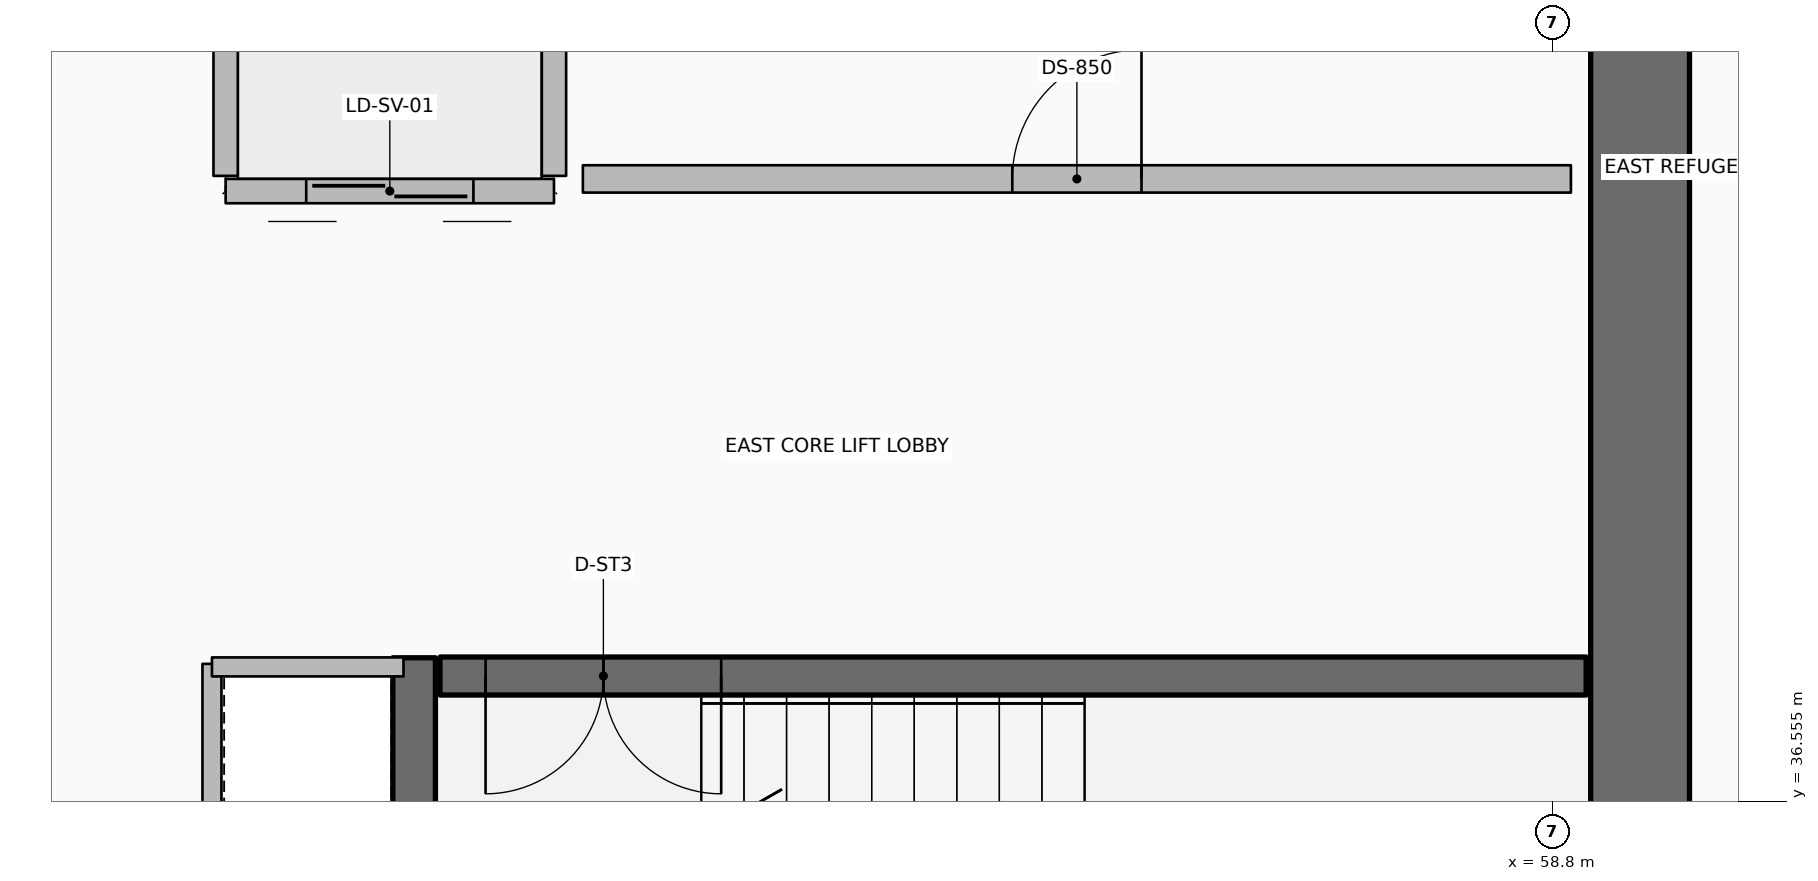
"""IFC4 building model, lengths in metres.
Left out: names, types, materials, properties, quantities, classifications, styles, units other than length and angle.
Written with IfcOpenShell. Run it as: python <this file> out.ifc"""

import sys

from ifc_helpers import new_model, si_unit, direction, frame, frame_2d, origin, origin_2d, place, context, subcontext, project, spatial, rectangle, hollow_rectangle, extrude, element, fill, save


model = new_model("IFC4")
c1 = context("Model", 3, precision=1e-05, world=origin(), true_north=direction((0.0, 1.0)))
c2 = subcontext(c1, "Body", "Model", "MODEL_VIEW")
j1 = project(units=[si_unit("LENGTHUNIT", "METRE"), si_unit("PLANEANGLEUNIT", "RADIAN")], contexts=[c1])
p1 = place(None, origin())
s1 = spatial("IfcSite", under=j1, at=p1, CompositionType="ELEMENT")
p2 = place(p1, origin())
s2 = spatial("IfcBuilding", under=s1, at=p2, CompositionType="ELEMENT")
p3 = place(p2, frame((0.0, 0.0, 225.3)))
s3 = spatial("IfcBuildingStorey", under=s2, at=p3, CompositionType="ELEMENT", Elevation=225.3)
p4 = place(p3, frame((59.375, 34.0, 0.0), z_axis=(0.0, 0.0, 1.0), x_axis=(0.0, 1.0, 0.0)))
e1 = element("IfcWall", 1, at=p4, inside=s3, PredefinedType="SHEAR", context=c2, shape_type="SweptSolid", body=[
    extrude(rectangle(XDim=16.0, YDim=0.65, at=frame_2d((8.0, 0.0))), origin(), (0.0, 0.0, 1.0), 6.6),
])
p5 = place(p3, frame((51.31, 34.0, 0.0), z_axis=(0.0, 0.0, 1.0), x_axis=(0.0, 1.0, 0.0)))
e2 = element("IfcWall", 2, at=p5, inside=s3, PredefinedType="SHEAR", context=c2, shape_type="SweptSolid", body=[
    extrude(rectangle(XDim=3.5, YDim=0.28, at=frame_2d((1.75, 0.0))), origin(), (0.0, 0.0, 1.0), 6.6),
])
p6 = place(p3, frame((55.72, 37.38, 0.0), z_axis=(0.0, 0.0, 1.0), x_axis=(1.0, 0.0, 0.0)))
e3 = element("IfcColumn", 3, at=p6, inside=s3, PredefinedType="COLUMN", context=c2, shape_type="SweptSolid", body=[
    extrude(hollow_rectangle(XDim=0.2, YDim=0.2, WallThickness=0.01, InnerFilletRadius=0.01, OuterFilletRadius=0.02, at=origin_2d()), origin(), (0.0, 0.0, 1.0), 1.445),
])
p7 = place(p3, frame((56.42, 37.38, 0.0), z_axis=(0.0, 0.0, 1.0), x_axis=(1.0, 0.0, 0.0)))
e4 = element("IfcColumn", 4, at=p7, inside=s3, PredefinedType="COLUMN", context=c2, shape_type="SweptSolid", body=[
    extrude(hollow_rectangle(XDim=0.2, YDim=0.2, WallThickness=0.01, InnerFilletRadius=0.01, OuterFilletRadius=0.02, at=origin_2d()), origin(), (0.0, 0.0, 1.0), 4.745),
])
p8 = place(p3, frame((51.48, 37.38, 0.0), z_axis=(0.0, 0.0, 1.0), x_axis=(1.0, 0.0, 0.0)))
e5 = element("IfcWall", 5, at=p8, inside=s3, PredefinedType="SOLIDWALL", context=c2, shape_type="SweptSolid", body=[
    extrude(rectangle(XDim=7.54, YDim=0.25, at=frame_2d((3.77, 0.0))), origin(), (0.0, 0.0, 1.0), 6.28),
])
p9 = place(p8, frame((0.3, 0.0, 0.0)))
e6 = element("IfcOpeningElement", 6, at=p9, cuts=e5, PredefinedType="OPENING", context=c2, shape_type="SweptSolid", body=[
    extrude(rectangle(XDim=1.55, YDim=2.15, at=frame_2d((0.775, 1.075))), frame((0.0, 0.135, 0.0), z_axis=(0.0, -1.0, 0.0), x_axis=(1.0, 0.0, 0.0)), (0.0, 0.0, 1.0), 0.27),
])
p10 = place(p3, frame((52.23, 40.57, 0.0), z_axis=(0.0, 0.0, 1.0), x_axis=(-1.0, 0.0, 0.0)))
e7 = element("IfcWall", 7, at=p10, inside=s3, PredefinedType="PARTITIONING", context=c2, shape_type="SweptSolid", body=[
    extrude(rectangle(XDim=2.16, YDim=0.16, at=frame_2d((1.08, 0.0))), origin(), (0.0, 0.0, 1.0), 6.28),
])
p11 = place(p10, frame((0.53, 0.0, 0.0)))
e8 = element("IfcOpeningElement", 8, at=p11, cuts=e7, PredefinedType="OPENING", context=c2, shape_type="SweptSolid", body=[
    extrude(rectangle(XDim=1.1, YDim=2.1, at=frame_2d((0.55, 1.05))), frame((0.0, 0.09, 0.0), z_axis=(0.0, -1.0, 0.0), x_axis=(1.0, 0.0, 0.0)), (0.0, 0.0, 1.0), 0.18),
])
for number, where, z_axis, x_axis in (
    (9, (52.23, 40.67, 0.0), (0.0, 0.0, 1.0), (0.0, 1.0, 0.0)),
    (10, (50.07, 40.67, 0.0), (0.0, 0.0, 1.0), (0.0, 1.0, 0.0)),
):
    element("IfcWall", number, at=place(p3, frame(where, z_axis=z_axis, x_axis=x_axis)), inside=s3, PredefinedType="PARTITIONING", context=c2, shape_type="SweptSolid", body=[
        extrude(rectangle(XDim=2.16, YDim=0.16, at=frame_2d((1.08, 0.0))), origin(), (0.0, 0.0, 1.0), 6.28),
    ])
p12 = place(p3, frame((52.42, 40.65, 0.0), z_axis=(0.0, 0.0, 1.0), x_axis=(1.0, 0.0, 0.0)))
e11 = element("IfcWall", 11, at=p12, inside=s3, PredefinedType="PARTITIONING", context=c2, shape_type="SweptSolid", body=[
    extrude(rectangle(XDim=6.5, YDim=0.18, at=frame_2d((3.25, 0.0))), origin(), (0.0, 0.0, 1.0), 6.28),
])
p13 = place(p12, frame((2.825, 0.0, 0.0)))
e12 = element("IfcOpeningElement", 12, at=p13, cuts=e11, PredefinedType="OPENING", context=c2, shape_type="SweptSolid", body=[
    extrude(rectangle(XDim=0.85, YDim=2.06, at=frame_2d((0.425, 1.03))), frame((0.0, 0.1, 0.0), z_axis=(0.0, -1.0, 0.0), x_axis=(1.0, 0.0, 0.0)), (0.0, 0.0, 1.0), 0.2),
])
p14 = place(p3, frame((49.98, 34.06, 0.0), z_axis=(0.0, 0.0, 1.0), x_axis=(0.0, 1.0, 0.0)))
e13 = element("IfcWall", 13, at=p14, inside=s3, PredefinedType="PARTITIONING", context=c2, shape_type="SweptSolid", body=[
    extrude(rectangle(XDim=3.4, YDim=0.125, at=frame_2d((1.7, 0.0))), origin(), (0.0, 0.0, 1.0), 5.72),
])
p15 = place(p3, frame((49.98, 37.44, 0.0), z_axis=(0.0, 0.0, 1.0), x_axis=(1.0, 0.0, 0.0)))
e14 = element("IfcWall", 14, at=p15, inside=s3, PredefinedType="PARTITIONING", context=c2, shape_type="SweptSolid", body=[
    extrude(rectangle(XDim=1.26, YDim=0.125, at=frame_2d((0.63, 0.0))), origin(), (0.0, 0.0, 1.0), 5.72),
])
p16 = place(p9, origin())
e15 = element("IfcDoor", 15, at=p16, inside=s3, OperationType="DOUBLE_DOOR_SINGLE_SWING", PredefinedType="DOOR", context=c2, shape_type="SweptSolid", body=[
    extrude(rectangle(XDim=1.55, YDim=2.15, at=frame_2d((0.775, 1.075))), frame((0.0, 0.025, 0.0), z_axis=(0.0, -1.0, 0.0), x_axis=(1.0, 0.0, 0.0)), (0.0, 0.0, 1.0), 0.05),
])
fill(e6, e15)
p17 = place(p11, origin())
e16 = element("IfcDoor", 16, at=p17, inside=s3, OperationType="DOUBLE_DOOR_SLIDING", PredefinedType="DOOR", context=c2, shape_type="SweptSolid", body=[
    extrude(rectangle(XDim=1.1, YDim=2.1, at=frame_2d((0.55, 1.05))), frame((0.0, 0.025, 0.0), z_axis=(0.0, -1.0, 0.0), x_axis=(1.0, 0.0, 0.0)), (0.0, 0.0, 1.0), 0.05),
])
fill(e8, e16)
p18 = place(p13, origin())
e17 = element("IfcDoor", 17, at=p18, inside=s3, OperationType="SINGLE_SWING_RIGHT", PredefinedType="DOOR", context=c2, shape_type="SweptSolid", body=[
    extrude(rectangle(XDim=0.85, YDim=2.06, at=frame_2d((0.425, 1.03))), frame((0.0, 0.025, 0.0), z_axis=(0.0, -1.0, 0.0), x_axis=(1.0, 0.0, 0.0)), (0.0, 0.0, 1.0), 0.05),
])
fill(e12, e17)
save(model, sys.argv[1])
